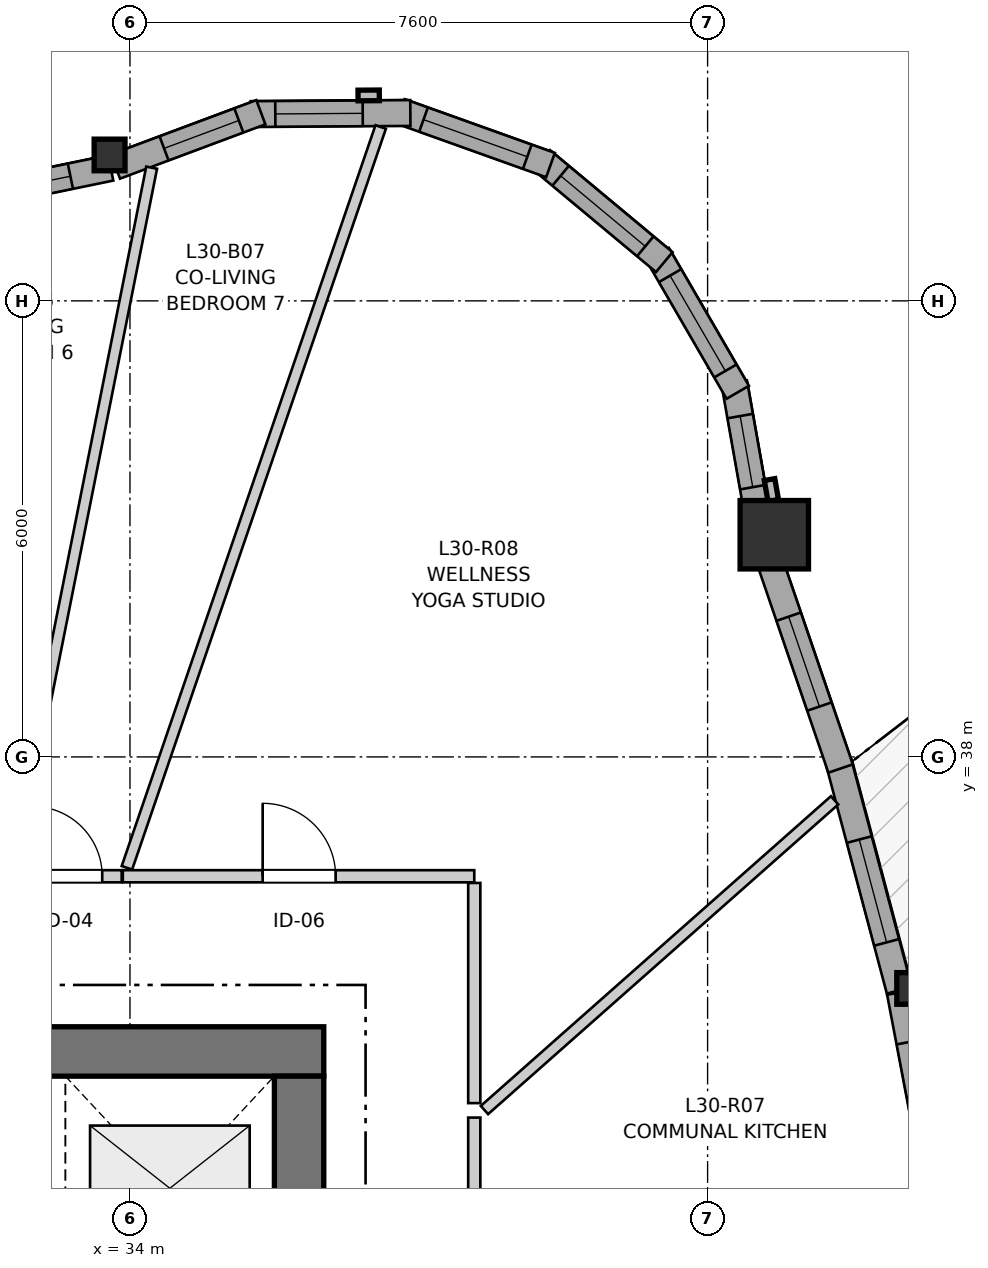
"""IFC4 building model, lengths in metres.
Left out: names, types, materials, properties, quantities, classifications, styles, units other than length and angle.
Written with IfcOpenShell. Run it as: python <this file> out.ifc"""

import sys

from ifc_helpers import new_model, si_unit, direction, frame, frame_2d, origin, origin_2d, place, context, subcontext, project, spatial, rectangle, i_section, extrude, source, transform, mapped, element, fill, save


model = new_model("IFC4")
c1 = context("Model", 3, precision=1e-05, world=origin(), true_north=direction((0.0, 1.0)))
c2 = subcontext(c1, "Body", "Model", "MODEL_VIEW")
j1 = project(units=[si_unit("LENGTHUNIT", "METRE"), si_unit("PLANEANGLEUNIT", "RADIAN")], contexts=[c1])
p1 = place(None, origin())
s1 = spatial("IfcSite", under=j1, at=p1, CompositionType="ELEMENT")
p2 = place(p1, origin())
s2 = spatial("IfcBuilding", under=s1, at=p2, CompositionType="ELEMENT")
p3 = place(p2, frame((0.0, 0.0, 102.4)))
s3 = spatial("IfcBuildingStorey", under=s2, at=p3, CompositionType="ELEMENT", Elevation=102.4)
p4 = place(p3, frame((36.55, 34.125, 0.0), z_axis=(0.0, 0.0, 1.0), x_axis=(-1.0, 0.0, 0.0)))
e1 = element("IfcWall", 1, at=p4, inside=s3, PredefinedType="SHEAR", context=c2, shape_type="SweptSolid", body=[
    extrude(rectangle(XDim=12.4, YDim=0.65, at=frame_2d((6.2, 0.0))), origin(), (0.0, 0.0, 1.0), 2.95),
])
p5 = place(p3, frame((36.225, 18.2, 0.0), z_axis=(0.0, 0.0, 1.0), x_axis=(0.0, 1.0, 0.0)))
e2 = element("IfcWall", 2, at=p5, inside=s3, PredefinedType="SHEAR", context=c2, shape_type="SweptSolid", body=[
    extrude(rectangle(XDim=15.6, YDim=0.65, at=frame_2d((7.8, 0.0))), origin(), (0.0, 0.0, 1.0), 2.95),
])
p6 = place(p5, frame((4.25, 0.0, 0.0)))
e3 = element("IfcOpeningElement", 3, at=p6, cuts=e2, PredefinedType="OPENING", context=c2, shape_type="SweptSolid", body=[
    extrude(rectangle(XDim=1.1, YDim=2.15, at=frame_2d((0.55, 1.075))), frame((0.0, 0.335, 0.0), z_axis=(0.0, -1.0, 0.0), x_axis=(1.0, 0.0, 0.0)), (0.0, 0.0, 1.0), 0.67),
])
p7 = place(p5, frame((10.25, 0.0, 0.0)))
e4 = element("IfcOpeningElement", 4, at=p7, cuts=e2, PredefinedType="OPENING", context=c2, shape_type="SweptSolid", body=[
    extrude(rectangle(XDim=1.1, YDim=2.15, at=frame_2d((0.55, 1.075))), frame((0.0, 0.335, 0.0), z_axis=(0.0, -1.0, 0.0), x_axis=(1.0, 0.0, 0.0)), (0.0, 0.0, 1.0), 0.67),
])
m1 = source(origin(), c2, "Body", "SweptSolid", [
    extrude(i_section(OverallWidth=0.406, OverallDepth=0.416, WebThickness=0.027, FlangeThickness=0.044, FilletRadius=0.015, at=origin_2d()), origin(), (0.0, 0.0, 1.0), 2.95),
])
p8 = place(p3, frame((44.292, 34.954, 0.0), z_axis=(0.0, 0.0, 1.0), x_axis=(1.0, 0.0, 0.0)))
e5 = element("IfcColumn", 5, at=p8, inside=s3, PredefinedType="PILASTER", context=c2, shape_type="MappedRepresentation", body=[
    mapped(m1, transform((0.0, 0.0, 0.0), x_axis=(1.0, 0.0, 0.0), y_axis=(0.0, 1.0, 0.0), z_axis=(0.0, 0.0, 1.0), scale=1.0)),
])
m2 = source(origin(), c2, "Body", "SweptSolid", [
    extrude(rectangle(XDim=0.9, YDim=0.9, at=origin_2d()), origin(), (0.0, 0.0, 1.0), 2.95),
])
p9 = place(p3, frame((42.478, 40.923, 0.0), z_axis=(0.0, 0.0, 1.0), x_axis=(1.0, 0.0, 0.0)))
e6 = element("IfcColumn", 6, at=p9, inside=s3, PredefinedType="COLUMN", context=c2, shape_type="MappedRepresentation", body=[
    mapped(m2, transform((0.0, 0.0, 0.0), x_axis=(1.0, 0.0, 0.0), y_axis=(0.0, 1.0, 0.0), z_axis=(0.0, 0.0, 1.0), scale=1.0)),
])
p10 = place(p3, frame((33.732, 45.92, 0.0), z_axis=(0.0, 0.0, 1.0), x_axis=(1.0, 0.0, 0.0)))
e7 = element("IfcColumn", 7, at=p10, inside=s3, PredefinedType="PILASTER", context=c2, shape_type="MappedRepresentation", body=[
    mapped(m1, transform((0.0, 0.0, 0.0), x_axis=(1.0, 0.0, 0.0), y_axis=(0.0, 1.0, 0.0), z_axis=(0.0, 0.0, 1.0), scale=1.0)),
])
p11 = place(p3, frame((44.699, 31.9, 0.0), z_axis=(0.0, 0.0, 1.0), x_axis=(-0.186689944156, 0.982418884566, 0.0)))
e8 = element("IfcWall", 8, at=p11, inside=s3, PredefinedType="SOLIDWALL", context=c2, shape_type="SweptSolid", body=[
    extrude(rectangle(XDim=3.056, YDim=0.34, at=frame_2d((1.528, 0.0))), origin(), (0.0, 0.0, 1.0), 2.48),
])
p12 = place(p11, frame((0.791, 0.0, 0.82)))
e9 = element("IfcOpeningElement", 9, at=p12, cuts=e8, PredefinedType="OPENING", context=c2, shape_type="SweptSolid", body=[
    extrude(rectangle(XDim=1.6, YDim=1.35, at=frame_2d((0.8, 0.675))), frame((0.0, 0.18, 0.0), z_axis=(0.0, -1.0, 0.0), x_axis=(1.0, 0.0, 0.0)), (0.0, 0.0, 1.0), 0.36),
])
p13 = place(p3, frame((44.123, 34.93, 0.0), z_axis=(0.0, 0.0, 1.0), x_axis=(-0.257080487516, 0.96638999526, 0.0)))
e10 = element("IfcWall", 10, at=p13, inside=s3, PredefinedType="SOLIDWALL", context=c2, shape_type="SweptSolid", body=[
    extrude(rectangle(XDim=3.106, YDim=0.34, at=frame_2d((1.553, 0.0))), origin(), (0.0, 0.0, 1.0), 2.48),
])
p14 = place(p13, frame((0.652, 0.0, 0.82)))
e11 = element("IfcOpeningElement", 11, at=p14, cuts=e10, PredefinedType="OPENING", context=c2, shape_type="SweptSolid", body=[
    extrude(rectangle(XDim=1.4, YDim=1.35, at=frame_2d((0.7, 0.675))), frame((0.0, 0.18, 0.0), z_axis=(0.0, -1.0, 0.0), x_axis=(1.0, 0.0, 0.0)), (0.0, 0.0, 1.0), 0.36),
])
p15 = place(p3, frame((43.35, 37.848, 0.0), z_axis=(0.0, 0.0, 1.0), x_axis=(-0.323561473353, 0.946207151189, 0.0)))
e12 = element("IfcWall", 12, at=p15, inside=s3, PredefinedType="SOLIDWALL", context=c2, shape_type="SweptSolid", body=[
    extrude(rectangle(XDim=2.962, YDim=0.34, at=frame_2d((1.481, 0.0))), origin(), (0.0, 0.0, 1.0), 2.48),
])
p16 = place(p15, frame((0.861, 0.0, 0.82)))
e13 = element("IfcOpeningElement", 13, at=p16, cuts=e12, PredefinedType="OPENING", context=c2, shape_type="SweptSolid", body=[
    extrude(rectangle(XDim=1.25, YDim=1.35, at=frame_2d((0.625, 0.675))), frame((0.0, 0.18, 0.0), z_axis=(0.0, -1.0, 0.0), x_axis=(1.0, 0.0, 0.0)), (0.0, 0.0, 1.0), 0.36),
])
p17 = place(p3, frame((42.27, 41.12, 0.0), z_axis=(0.0, 0.0, 1.0), x_axis=(-0.17440141227, 0.984674640375, 0.0)))
e14 = element("IfcWall", 14, at=p17, inside=s3, PredefinedType="SOLIDWALL", context=c2, shape_type="SweptSolid", body=[
    extrude(rectangle(XDim=1.831, YDim=0.34, at=frame_2d((0.916, 0.0))), origin(), (0.0, 0.0, 1.0), 2.48),
])
p18 = place(p17, frame((0.436, 0.0, 0.82)))
e15 = element("IfcOpeningElement", 15, at=p18, cuts=e14, PredefinedType="OPENING", context=c2, shape_type="SweptSolid", body=[
    extrude(rectangle(XDim=0.95, YDim=1.35, at=frame_2d((0.475, 0.675))), frame((0.0, 0.18, 0.0), z_axis=(0.0, -1.0, 0.0), x_axis=(1.0, 0.0, 0.0)), (0.0, 0.0, 1.0), 0.36),
])
p19 = place(p3, frame((41.997, 42.797, 0.0), z_axis=(0.0, 0.0, 1.0), x_axis=(-0.501902596059, 0.864924149315, 0.0)))
e16 = element("IfcWall", 16, at=p19, inside=s3, PredefinedType="SOLIDWALL", context=c2, shape_type="SweptSolid", body=[
    extrude(rectangle(XDim=2.099, YDim=0.34, at=frame_2d((1.049, 0.0))), origin(), (0.0, 0.0, 1.0), 2.48),
])
p20 = place(p19, frame((0.324, 0.0, 0.82)))
e17 = element("IfcOpeningElement", 17, at=p20, cuts=e16, PredefinedType="OPENING", context=c2, shape_type="SweptSolid", body=[
    extrude(rectangle(XDim=1.45, YDim=1.25, at=frame_2d((0.725, 0.625))), frame((0.0, 0.18, 0.0), z_axis=(0.0, -1.0, 0.0), x_axis=(1.0, 0.0, 0.0)), (0.0, 0.0, 1.0), 0.36),
])
p21 = place(p3, frame((41.03, 44.51, 0.0), z_axis=(0.0, 0.0, 1.0), x_axis=(-0.768497696041, 0.639852554249, 0.0)))
e18 = element("IfcWall", 18, at=p21, inside=s3, PredefinedType="SOLIDWALL", context=c2, shape_type="SweptSolid", body=[
    extrude(rectangle(XDim=2.099, YDim=0.34, at=frame_2d((1.049, 0.0))), origin(), (0.0, 0.0, 1.0), 2.48),
])
p22 = place(p21, frame((0.324, 0.0, 0.82)))
e19 = element("IfcOpeningElement", 19, at=p22, cuts=e18, PredefinedType="OPENING", context=c2, shape_type="SweptSolid", body=[
    extrude(rectangle(XDim=1.45, YDim=1.25, at=frame_2d((0.725, 0.625))), frame((0.0, 0.18, 0.0), z_axis=(0.0, -1.0, 0.0), x_axis=(1.0, 0.0, 0.0)), (0.0, 0.0, 1.0), 0.36),
])
p23 = place(p3, frame((39.533, 45.787, 0.0), z_axis=(0.0, 0.0, 1.0), x_axis=(-0.941523304278, 0.336947870598, 0.0)))
e20 = element("IfcWall", 20, at=p23, inside=s3, PredefinedType="SOLIDWALL", context=c2, shape_type="SweptSolid", body=[
    extrude(rectangle(XDim=2.099, YDim=0.34, at=frame_2d((1.05, 0.0))), origin(), (0.0, 0.0, 1.0), 2.48),
])
p24 = place(p23, frame((0.324, 0.0, 0.82)))
e21 = element("IfcOpeningElement", 21, at=p24, cuts=e20, PredefinedType="OPENING", context=c2, shape_type="SweptSolid", body=[
    extrude(rectangle(XDim=1.45, YDim=1.25, at=frame_2d((0.725, 0.625))), frame((0.0, 0.18, 0.0), z_axis=(0.0, -1.0, 0.0), x_axis=(1.0, 0.0, 0.0)), (0.0, 0.0, 1.0), 0.36),
])
p25 = place(p3, frame((37.689, 46.471, 0.0), z_axis=(0.0, 0.0, 1.0), x_axis=(-0.999976456891, -0.00686189939, 0.0)))
e22 = element("IfcWall", 22, at=p25, inside=s3, PredefinedType="SOLIDWALL", context=c2, shape_type="SweptSolid", body=[
    extrude(rectangle(XDim=2.099, YDim=0.34, at=frame_2d((1.05, 0.0))), origin(), (0.0, 0.0, 1.0), 2.48),
])
p26 = place(p25, frame((0.627, 0.0, 0.82)))
e23 = element("IfcOpeningElement", 23, at=p26, cuts=e22, PredefinedType="OPENING", context=c2, shape_type="SweptSolid", body=[
    extrude(rectangle(XDim=1.15, YDim=1.2, at=frame_2d((0.575, 0.6))), frame((0.0, 0.18, 0.0), z_axis=(0.0, -1.0, 0.0), x_axis=(1.0, 0.0, 0.0)), (0.0, 0.0, 1.0), 0.36),
])
p27 = place(p3, frame((35.722, 46.481, 0.0), z_axis=(0.0, 0.0, 1.0), x_axis=(-0.9368002254, -0.349864741994, 0.0)))
e24 = element("IfcWall", 24, at=p27, inside=s3, PredefinedType="SOLIDWALL", context=c2, shape_type="SweptSolid", body=[
    extrude(rectangle(XDim=2.041, YDim=0.34, at=frame_2d((1.021, 0.0))), origin(), (0.0, 0.0, 1.0), 2.48),
])
p28 = place(p27, frame((0.309, 0.0, 0.82)))
e25 = element("IfcOpeningElement", 25, at=p28, cuts=e24, PredefinedType="OPENING", context=c2, shape_type="SweptSolid", body=[
    extrude(rectangle(XDim=1.05, YDim=1.45, at=frame_2d((0.525, 0.725))), frame((0.0, 0.18, 0.0), z_axis=(0.0, -1.0, 0.0), x_axis=(1.0, 0.0, 0.0)), (0.0, 0.0, 1.0), 0.36),
])
p29 = place(p3, frame((33.747, 45.749, 0.0), z_axis=(0.0, 0.0, 1.0), x_axis=(-0.979440240026, -0.201734519153, 0.0)))
e26 = element("IfcWall", 26, at=p29, inside=s3, PredefinedType="SOLIDWALL", context=c2, shape_type="SweptSolid", body=[
    extrude(rectangle(XDim=3.124, YDim=0.34, at=frame_2d((1.562, 0.0))), origin(), (0.0, 0.0, 1.0), 2.48),
])
p30 = place(p29, frame((0.541, 0.0, 0.82)))
e27 = element("IfcOpeningElement", 27, at=p30, cuts=e26, PredefinedType="OPENING", context=c2, shape_type="SweptSolid", body=[
    extrude(rectangle(XDim=1.65, YDim=1.45, at=frame_2d((0.825, 0.725))), frame((0.0, 0.18, 0.0), z_axis=(0.0, -1.0, 0.0), x_axis=(1.0, 0.0, 0.0)), (0.0, 0.0, 1.0), 0.36),
])
p31 = place(p3, frame((33.906, 36.43, 0.0), z_axis=(0.0, 0.0, 1.0), x_axis=(1.0, 0.0, 0.0)))
e28 = element("IfcWall", 28, at=p31, inside=s3, PredefinedType="PARTITIONING", context=c2, shape_type="SweptSolid", body=[
    extrude(rectangle(XDim=4.624, YDim=0.16, at=frame_2d((2.312, 0.0))), origin(), (0.0, 0.0, 1.0), 2.588),
])
p32 = place(p31, frame((1.84, 0.0, 0.0)))
e29 = element("IfcOpeningElement", 29, at=p32, cuts=e28, PredefinedType="OPENING", context=c2, shape_type="SweptSolid", body=[
    extrude(rectangle(XDim=0.96, YDim=2.1, at=frame_2d((0.48, 1.05))), frame((0.0, 0.09, 0.0), z_axis=(0.0, -1.0, 0.0), x_axis=(1.0, 0.0, 0.0)), (0.0, 0.0, 1.0), 0.18),
])
p33 = place(p3, frame((38.53, 33.255, 0.0), z_axis=(0.0, 0.0, 1.0), x_axis=(0.0, -1.0, 0.0)))
e30 = element("IfcWall", 30, at=p33, inside=s3, PredefinedType="PARTITIONING", context=c2, shape_type="SweptSolid", body=[
    extrude(rectangle(XDim=3.726, YDim=0.16, at=frame_2d((1.863, 0.0))), origin(), (0.0, 0.0, 1.0), 2.95),
])
p34 = place(p33, frame((1.239, 0.0, 0.0)))
e31 = element("IfcOpeningElement", 31, at=p34, cuts=e30, PredefinedType="OPENING", context=c2, shape_type="SweptSolid", body=[
    extrude(rectangle(XDim=1.3, YDim=2.1, at=frame_2d((0.65, 1.05))), frame((0.0, 0.09, 0.0), z_axis=(0.0, -1.0, 0.0), x_axis=(1.0, 0.0, 0.0)), (0.0, 0.0, 1.0), 0.18),
])
p35 = place(p3, frame((32.458, 36.43, 0.0), z_axis=(0.0, 0.0, 1.0), x_axis=(1.0, 0.0, 0.0)))
e32 = element("IfcWall", 32, at=p35, inside=s3, PredefinedType="PARTITIONING", context=c2, shape_type="SweptSolid", body=[
    extrude(rectangle(XDim=1.433, YDim=0.16, at=frame_2d((0.717, 0.0))), origin(), (0.0, 0.0, 1.0), 2.95),
])
p36 = place(p35, frame((0.257, 0.0, 0.0)))
e33 = element("IfcOpeningElement", 33, at=p36, cuts=e32, PredefinedType="OPENING", context=c2, shape_type="SweptSolid", body=[
    extrude(rectangle(XDim=0.92, YDim=2.1, at=frame_2d((0.46, 1.05))), frame((0.0, 0.09, 0.0), z_axis=(0.0, -1.0, 0.0), x_axis=(1.0, 0.0, 0.0)), (0.0, 0.0, 1.0), 0.18),
])
p37 = place(p3, frame((33.96, 36.541, 0.0), z_axis=(0.0, 0.0, 1.0), x_axis=(0.324058346196, 0.946037096662, 0.0)))
e34 = element("IfcWall", 34, at=p37, inside=s3, PredefinedType="PARTITIONING", context=c2, shape_type="SweptSolid", body=[
    extrude(rectangle(XDim=10.302, YDim=0.145, at=frame_2d((5.151, 0.0))), origin(), (0.0, 0.0, 1.0), 2.95),
])
p38 = place(p3, frame((32.448, 36.532, 0.0), z_axis=(0.0, 0.0, 1.0), x_axis=(0.195406965811, 0.980722242897, 0.0)))
e35 = element("IfcWall", 35, at=p38, inside=s3, PredefinedType="PARTITIONING", context=c2, shape_type="SweptSolid", body=[
    extrude(rectangle(XDim=9.402, YDim=0.145, at=frame_2d((4.701, 0.0))), origin(), (0.0, 0.0, 1.0), 2.95),
])
p39 = place(p3, frame((38.664, 33.354, 0.0), z_axis=(0.0, 0.0, 1.0), x_axis=(0.749069296105, 0.662491652501, 0.0)))
e36 = element("IfcWall", 36, at=p39, inside=s3, PredefinedType="PARTITIONING", context=c2, shape_type="SweptSolid", body=[
    extrude(rectangle(XDim=6.15, YDim=0.145, at=frame_2d((3.075, 0.0))), origin(), (0.0, 0.0, 1.0), 2.95),
])
p40 = place(p3, frame((38.53, 33.446, 0.0), z_axis=(0.0, 0.0, 1.0), x_axis=(0.0, 1.0, 0.0)))
e37 = element("IfcWall", 37, at=p40, inside=s3, PredefinedType="PARTITIONING", context=c2, shape_type="SweptSolid", body=[
    extrude(rectangle(XDim=2.896, YDim=0.16, at=frame_2d((1.448, 0.0))), origin(), (0.0, 0.0, 1.0), 2.588),
])
m3 = source(origin(), c2, "Body", "SweptSolid", [
    extrude(rectangle(XDim=1.6, YDim=1.35, at=frame_2d((0.8, 0.675))), frame((0.0, 0.03, 0.0), z_axis=(0.0, -1.0, 0.0), x_axis=(1.0, 0.0, 0.0)), (0.0, 0.0, 1.0), 0.06),
])
p41 = place(p12, origin())
e38 = element("IfcWindow", 38, at=p41, inside=s3, PartitioningType="SINGLE_PANEL", PredefinedType="WINDOW", context=c2, shape_type="MappedRepresentation", body=[
    mapped(m3, transform((0.0, 0.0, 0.0), x_axis=(1.0, 0.0, 0.0), y_axis=(0.0, 1.0, 0.0), z_axis=(0.0, 0.0, 1.0), scale=1.0)),
])
fill(e9, e38)
m4 = source(origin(), c2, "Body", "SweptSolid", [
    extrude(rectangle(XDim=1.4, YDim=1.35, at=frame_2d((0.7, 0.675))), frame((0.0, 0.03, 0.0), z_axis=(0.0, -1.0, 0.0), x_axis=(1.0, 0.0, 0.0)), (0.0, 0.0, 1.0), 0.06),
])
p42 = place(p14, origin())
e39 = element("IfcWindow", 39, at=p42, inside=s3, PartitioningType="SINGLE_PANEL", PredefinedType="WINDOW", context=c2, shape_type="MappedRepresentation", body=[
    mapped(m4, transform((0.0, 0.0, 0.0), x_axis=(1.0, 0.0, 0.0), y_axis=(0.0, 1.0, 0.0), z_axis=(0.0, 0.0, 1.0), scale=1.0)),
])
fill(e11, e39)
m5 = source(origin(), c2, "Body", "SweptSolid", [
    extrude(rectangle(XDim=1.25, YDim=1.35, at=frame_2d((0.625, 0.675))), frame((0.0, 0.03, 0.0), z_axis=(0.0, -1.0, 0.0), x_axis=(1.0, 0.0, 0.0)), (0.0, 0.0, 1.0), 0.06),
])
p43 = place(p16, origin())
e40 = element("IfcWindow", 40, at=p43, inside=s3, PartitioningType="SINGLE_PANEL", PredefinedType="WINDOW", context=c2, shape_type="MappedRepresentation", body=[
    mapped(m5, transform((0.0, 0.0, 0.0), x_axis=(1.0, 0.0, 0.0), y_axis=(0.0, 1.0, 0.0), z_axis=(0.0, 0.0, 1.0), scale=1.0)),
])
fill(e13, e40)
m6 = source(origin(), c2, "Body", "SweptSolid", [
    extrude(rectangle(XDim=0.95, YDim=1.35, at=frame_2d((0.475, 0.675))), frame((0.0, 0.03, 0.0), z_axis=(0.0, -1.0, 0.0), x_axis=(1.0, 0.0, 0.0)), (0.0, 0.0, 1.0), 0.06),
])
p44 = place(p18, origin())
e41 = element("IfcWindow", 41, at=p44, inside=s3, PartitioningType="SINGLE_PANEL", PredefinedType="WINDOW", context=c2, shape_type="MappedRepresentation", body=[
    mapped(m6, transform((0.0, 0.0, 0.0), x_axis=(1.0, 0.0, 0.0), y_axis=(0.0, 1.0, 0.0), z_axis=(0.0, 0.0, 1.0), scale=1.0)),
])
fill(e15, e41)
m7 = source(origin(), c2, "Body", "SweptSolid", [
    extrude(rectangle(XDim=1.45, YDim=1.25, at=frame_2d((0.725, 0.625))), frame((0.0, 0.03, 0.0), z_axis=(0.0, -1.0, 0.0), x_axis=(1.0, 0.0, 0.0)), (0.0, 0.0, 1.0), 0.06),
])
p45 = place(p20, origin())
e42 = element("IfcWindow", 42, at=p45, inside=s3, PartitioningType="SINGLE_PANEL", PredefinedType="WINDOW", context=c2, shape_type="MappedRepresentation", body=[
    mapped(m7, transform((0.0, 0.0, 0.0), x_axis=(1.0, 0.0, 0.0), y_axis=(0.0, 1.0, 0.0), z_axis=(0.0, 0.0, 1.0), scale=1.0)),
])
fill(e17, e42)
p46 = place(p22, origin())
e43 = element("IfcWindow", 43, at=p46, inside=s3, PartitioningType="SINGLE_PANEL", PredefinedType="WINDOW", context=c2, shape_type="MappedRepresentation", body=[
    mapped(m7, transform((0.0, 0.0, 0.0), x_axis=(1.0, 0.0, 0.0), y_axis=(0.0, 1.0, 0.0), z_axis=(0.0, 0.0, 1.0), scale=1.0)),
])
fill(e19, e43)
p47 = place(p24, origin())
e44 = element("IfcWindow", 44, at=p47, inside=s3, PartitioningType="SINGLE_PANEL", PredefinedType="WINDOW", context=c2, shape_type="MappedRepresentation", body=[
    mapped(m7, transform((0.0, 0.0, 0.0), x_axis=(1.0, 0.0, 0.0), y_axis=(0.0, 1.0, 0.0), z_axis=(0.0, 0.0, 1.0), scale=1.0)),
])
fill(e21, e44)
m8 = source(origin(), c2, "Body", "SweptSolid", [
    extrude(rectangle(XDim=1.15, YDim=1.2, at=frame_2d((0.575, 0.6))), frame((0.0, 0.03, 0.0), z_axis=(0.0, -1.0, 0.0), x_axis=(1.0, 0.0, 0.0)), (0.0, 0.0, 1.0), 0.06),
])
p48 = place(p26, origin())
e45 = element("IfcWindow", 45, at=p48, inside=s3, PartitioningType="SINGLE_PANEL", PredefinedType="WINDOW", context=c2, shape_type="MappedRepresentation", body=[
    mapped(m8, transform((0.0, 0.0, 0.0), x_axis=(1.0, 0.0, 0.0), y_axis=(0.0, 1.0, 0.0), z_axis=(0.0, 0.0, 1.0), scale=1.0)),
])
fill(e23, e45)
m9 = source(origin(), c2, "Body", "SweptSolid", [
    extrude(rectangle(XDim=1.05, YDim=1.45, at=frame_2d((0.525, 0.725))), frame((0.0, 0.03, 0.0), z_axis=(0.0, -1.0, 0.0), x_axis=(1.0, 0.0, 0.0)), (0.0, 0.0, 1.0), 0.06),
])
p49 = place(p28, origin())
e46 = element("IfcWindow", 46, at=p49, inside=s3, PartitioningType="SINGLE_PANEL", PredefinedType="WINDOW", context=c2, shape_type="MappedRepresentation", body=[
    mapped(m9, transform((0.0, 0.0, 0.0), x_axis=(1.0, 0.0, 0.0), y_axis=(0.0, 1.0, 0.0), z_axis=(0.0, 0.0, 1.0), scale=1.0)),
])
fill(e25, e46)
m10 = source(origin(), c2, "Body", "SweptSolid", [
    extrude(rectangle(XDim=1.65, YDim=1.45, at=frame_2d((0.825, 0.725))), frame((0.0, 0.03, 0.0), z_axis=(0.0, -1.0, 0.0), x_axis=(1.0, 0.0, 0.0)), (0.0, 0.0, 1.0), 0.06),
])
p50 = place(p30, origin())
e47 = element("IfcWindow", 47, at=p50, inside=s3, PartitioningType="SINGLE_PANEL", PredefinedType="WINDOW", context=c2, shape_type="MappedRepresentation", body=[
    mapped(m10, transform((0.0, 0.0, 0.0), x_axis=(1.0, 0.0, 0.0), y_axis=(0.0, 1.0, 0.0), z_axis=(0.0, 0.0, 1.0), scale=1.0)),
])
fill(e27, e47)
m11 = source(origin(), c2, "Body", "SweptSolid", [
    extrude(rectangle(XDim=0.96, YDim=2.1, at=frame_2d((0.48, 1.05))), frame((0.0, 0.025, 0.0), z_axis=(0.0, -1.0, 0.0), x_axis=(1.0, 0.0, 0.0)), (0.0, 0.0, 1.0), 0.05),
])
p51 = place(p32, origin())
e48 = element("IfcDoor", 48, at=p51, inside=s3, OperationType="SINGLE_SWING_LEFT", PredefinedType="DOOR", context=c2, shape_type="MappedRepresentation", body=[
    mapped(m11, transform((0.0, 0.0, 0.0), x_axis=(1.0, 0.0, 0.0), y_axis=(0.0, 1.0, 0.0), z_axis=(0.0, 0.0, 1.0), scale=1.0)),
])
fill(e29, e48)
m12 = source(origin(), c2, "Body", "SweptSolid", [
    extrude(rectangle(XDim=0.92, YDim=2.1, at=frame_2d((0.46, 1.05))), frame((0.0, 0.025, 0.0), z_axis=(0.0, -1.0, 0.0), x_axis=(1.0, 0.0, 0.0)), (0.0, 0.0, 1.0), 0.05),
])
p52 = place(p36, origin())
e49 = element("IfcDoor", 49, at=p52, inside=s3, OperationType="SINGLE_SWING_LEFT", PredefinedType="DOOR", context=c2, shape_type="MappedRepresentation", body=[
    mapped(m12, transform((0.0, 0.0, 0.0), x_axis=(1.0, 0.0, 0.0), y_axis=(0.0, 1.0, 0.0), z_axis=(0.0, 0.0, 1.0), scale=1.0)),
])
fill(e33, e49)
save(model, sys.argv[1])
